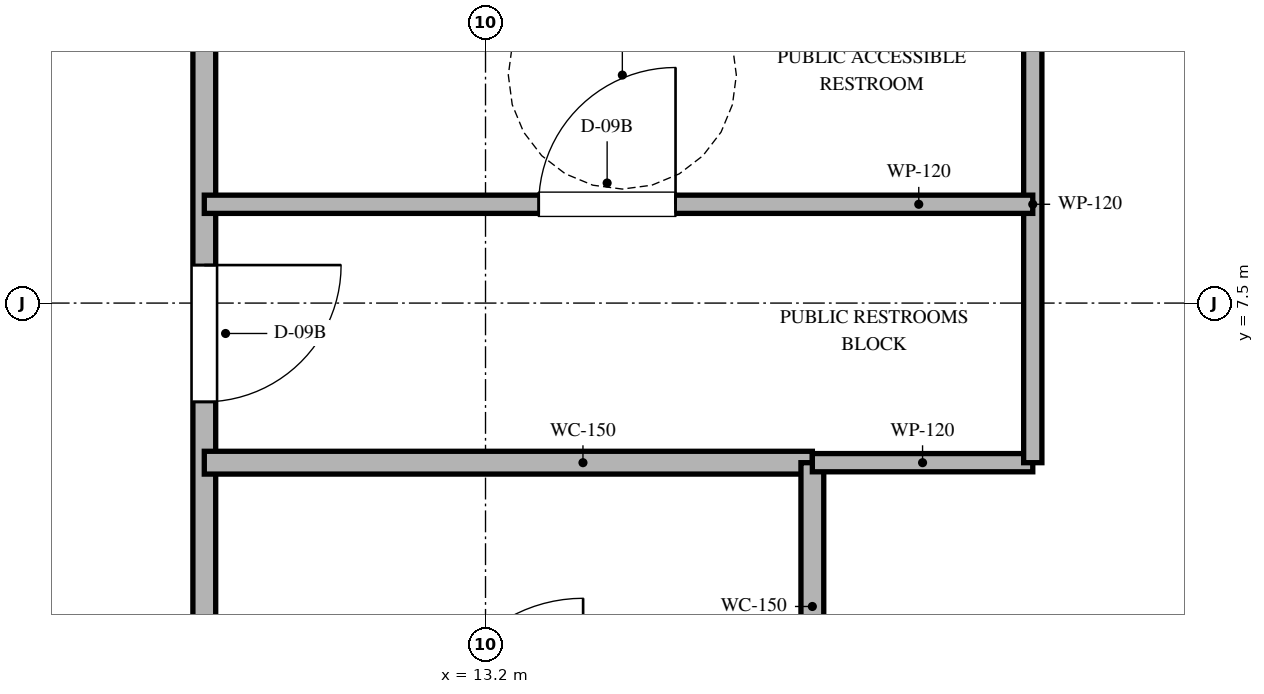
"""IFC4 building model, lengths in metres.
Left out: names, types, materials, properties, quantities, classifications, styles, units other than length and angle.
Written with IfcOpenShell. Run it as: python <this file> out.ifc"""

import sys

from ifc_helpers import new_model, si_unit, direction, frame, frame_2d, origin, place, context, subcontext, project, spatial, rectangle, extrude, element, fill, save


model = new_model("IFC4")
c1 = context("Model", 3, precision=1e-05, world=origin(), true_north=direction((0.0, 1.0)))
c2 = subcontext(c1, "Body", "Model", "MODEL_VIEW")
j1 = project(units=[si_unit("LENGTHUNIT", "METRE"), si_unit("PLANEANGLEUNIT", "RADIAN")], contexts=[c1])
p1 = place(None, origin())
s1 = spatial("IfcSite", under=j1, at=p1, CompositionType="ELEMENT")
p2 = place(p1, origin())
s2 = spatial("IfcBuilding", under=s1, at=p2, CompositionType="ELEMENT")
p3 = place(p2, frame((0.0, 0.0, 11.4)))
s3 = spatial("IfcBuildingStorey", under=s2, at=p3, CompositionType="ELEMENT", Elevation=11.4)
p4 = place(p3, frame((11.35, 9.85, 0.0), z_axis=(0.0, 0.0, 1.0), x_axis=(0.0, -1.0, 0.0)))
e1 = element("IfcWall", 1, at=p4, inside=s3, PredefinedType="PARTITIONING", context=c2, shape_type="SweptSolid", body=[
    extrude(rectangle(XDim=19.7, YDim=0.15, at=frame_2d((9.85, 0.0))), origin(), (0.0, 0.0, 1.0), 5.922),
])
p5 = place(p4, frame((2.1, 0.0, 0.0)))
e2 = element("IfcOpeningElement", 2, at=p5, cuts=e1, PredefinedType="OPENING", context=c2, shape_type="SweptSolid", body=[
    extrude(rectangle(XDim=0.9, YDim=2.03, at=frame_2d((0.45, 1.015))), frame((0.0, 0.085, 0.0), z_axis=(0.0, -1.0, 0.0), x_axis=(1.0, 0.0, 0.0)), (0.0, 0.0, 1.0), 0.17),
])
p6 = place(p4, frame((16.875, 0.0, 0.0)))
e3 = element("IfcOpeningElement", 3, at=p6, cuts=e1, PredefinedType="OPENING", context=c2, shape_type="SweptSolid", body=[
    extrude(rectangle(XDim=1.0, YDim=2.03, at=frame_2d((0.5, 1.015))), frame((0.0, 0.085, 0.0), z_axis=(0.0, -1.0, 0.0), x_axis=(1.0, 0.0, 0.0)), (0.0, 0.0, 1.0), 0.17),
])
p7 = place(p3, frame((11.35, 6.45, 0.0), z_axis=(0.0, 0.0, 1.0), x_axis=(1.0, 0.0, 0.0)))
e4 = element("IfcWall", 4, at=p7, inside=s3, PredefinedType="PARTITIONING", context=c2, shape_type="SweptSolid", body=[
    extrude(rectangle(XDim=4.0, YDim=0.15, at=frame_2d((2.0, 0.0))), origin(), (0.0, 0.0, 1.0), 6.88),
])
p8 = place(p3, frame((15.35, 4.558, 0.0), z_axis=(0.0, 0.0, 1.0), x_axis=(0.0, 1.0, 0.0)))
e5 = element("IfcWall", 5, at=p8, inside=s3, PredefinedType="PARTITIONING", context=c2, shape_type="SweptSolid", body=[
    extrude(rectangle(XDim=1.892, YDim=0.15, at=frame_2d((0.946, 0.0))), origin(), (0.0, 0.0, 1.0), 6.88),
])
p9 = place(p3, frame((15.35, 6.45, 0.0), z_axis=(0.0, 0.0, 1.0), x_axis=(1.0, 0.0, 0.0)))
e6 = element("IfcWall", 6, at=p9, inside=s3, PredefinedType="PARTITIONING", context=c2, shape_type="SweptSolid", body=[
    extrude(rectangle(XDim=1.45, YDim=0.12, at=frame_2d((0.725, 0.0))), origin(), (0.0, 0.0, 1.0), 6.88),
])
p10 = place(p3, frame((16.8, 6.45, 0.0), z_axis=(0.0, 0.0, 1.0), x_axis=(0.0, 1.0, 0.0)))
e7 = element("IfcWall", 7, at=p10, inside=s3, PredefinedType="PARTITIONING", context=c2, shape_type="SweptSolid", body=[
    extrude(rectangle(XDim=3.4, YDim=0.12, at=frame_2d((1.7, 0.0))), origin(), (0.0, 0.0, 1.0), 6.88),
])
p11 = place(p3, frame((11.35, 8.15, 0.0), z_axis=(0.0, 0.0, 1.0), x_axis=(1.0, 0.0, 0.0)))
e8 = element("IfcWall", 8, at=p11, inside=s3, PredefinedType="PARTITIONING", context=c2, shape_type="SweptSolid", body=[
    extrude(rectangle(XDim=5.45, YDim=0.12, at=frame_2d((2.725, 0.0))), origin(), (0.0, 0.0, 1.0), 6.88),
])
p12 = place(p11, frame((2.2, 0.0, 0.0)))
e9 = element("IfcOpeningElement", 9, at=p12, cuts=e8, PredefinedType="OPENING", context=c2, shape_type="SweptSolid", body=[
    extrude(rectangle(XDim=0.9, YDim=2.03, at=frame_2d((0.45, 1.015))), frame((0.0, 0.07, 0.0), z_axis=(0.0, -1.0, 0.0), x_axis=(1.0, 0.0, 0.0)), (0.0, 0.0, 1.0), 0.14),
])
p13 = place(p5, origin())
e10 = element("IfcDoor", 10, at=p13, inside=s3, OperationType="SINGLE_SWING_LEFT", PredefinedType="DOOR", context=c2, shape_type="SweptSolid", body=[
    extrude(rectangle(XDim=0.9, YDim=2.03, at=frame_2d((0.45, 1.015))), frame((0.0, 0.025, 0.0), z_axis=(0.0, -1.0, 0.0), x_axis=(1.0, 0.0, 0.0)), (0.0, 0.0, 1.0), 0.05),
])
fill(e2, e10)
p14 = place(p12, origin())
e11 = element("IfcDoor", 11, at=p14, inside=s3, OperationType="SINGLE_SWING_RIGHT", PredefinedType="DOOR", context=c2, shape_type="SweptSolid", body=[
    extrude(rectangle(XDim=0.9, YDim=2.03, at=frame_2d((0.45, 1.015))), frame((0.0, 0.025, 0.0), z_axis=(0.0, -1.0, 0.0), x_axis=(1.0, 0.0, 0.0)), (0.0, 0.0, 1.0), 0.05),
])
fill(e9, e11)
save(model, sys.argv[1])
